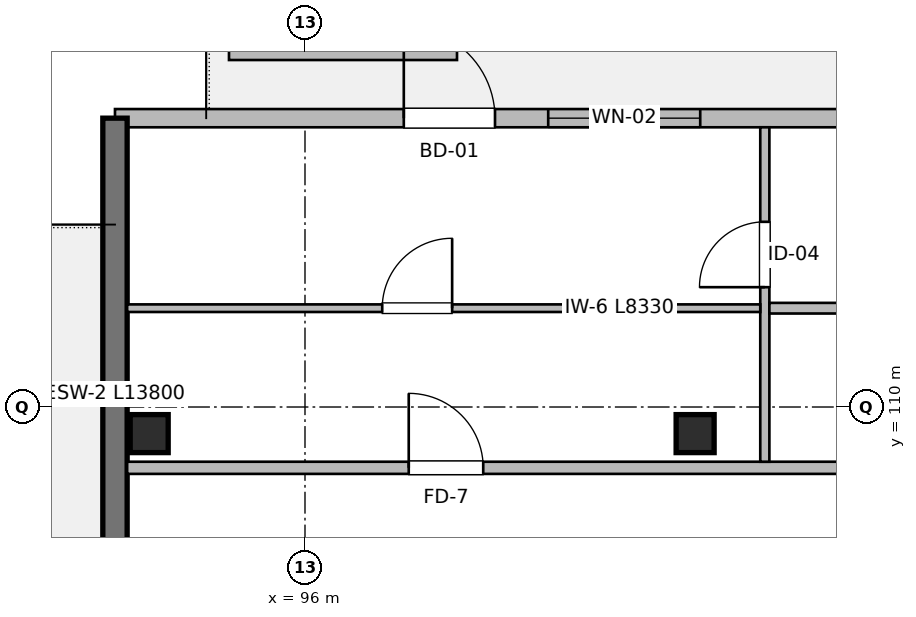
"""IFC4 building model, lengths in metres.
Left out: names, types, materials, properties, quantities, classifications, styles, units other than length and angle.
Written with IfcOpenShell. Run it as: python <this file> out.ifc"""

import sys

from ifc_helpers import new_model, si_unit, direction, frame, frame_2d, origin, origin_2d, place, context, subcontext, project, spatial, rectangle, extrude, element, fill, save


model = new_model("IFC4")
c1 = context("Model", 3, precision=1e-05, world=origin(), true_north=direction((0.0, 1.0)))
c2 = subcontext(c1, "Body", "Model", "MODEL_VIEW")
j1 = project(units=[si_unit("LENGTHUNIT", "METRE"), si_unit("PLANEANGLEUNIT", "RADIAN")], contexts=[c1])
p1 = place(None, origin())
s1 = spatial("IfcSite", under=j1, at=p1, CompositionType="ELEMENT")
p2 = place(p1, origin())
s2 = spatial("IfcBuilding", under=s1, at=p2, CompositionType="ELEMENT")
p3 = place(p2, frame((0.0, 0.0, 36.16)))
s3 = spatial("IfcBuildingStorey", under=s2, at=p3, CompositionType="ELEMENT", Elevation=36.16)
for number, where, z_axis, x_axis in (
    (1, (93.95, 109.65, 0.0), (0.0, 0.0, 1.0), (1.0, 0.0, 0.0)),
    (2, (101.133, 109.65, 0.0), (0.0, 0.0, 1.0), (1.0, 0.0, 0.0)),
):
    element("IfcColumn", number, at=place(p3, frame(where, z_axis=z_axis, x_axis=x_axis)), inside=s3, PredefinedType="COLUMN", context=c2, shape_type="SweptSolid", body=[
        extrude(rectangle(XDim=0.5, YDim=0.5, at=origin_2d()), origin(), (0.0, 0.0, 1.0), 3.2),
    ])
p4 = place(p3, frame((93.5, 113.8, 0.0), z_axis=(0.0, 0.0, 1.0), x_axis=(1.0, 0.0, 0.0)))
e3 = element("IfcWall", 3, at=p4, inside=s3, PredefinedType="SOLIDWALL", context=c2, shape_type="SweptSolid", body=[
    extrude(rectangle(XDim=44.0, YDim=0.24, at=frame_2d((22.0, 0.0))), origin(), (0.0, 0.0, 1.0), 2.98),
])
p5 = place(p4, frame((3.8, 0.0, 0.0)))
e4 = element("IfcOpeningElement", 4, at=p5, cuts=e3, PredefinedType="OPENING", context=c2, shape_type="SweptSolid", body=[
    extrude(rectangle(XDim=1.2, YDim=2.2, at=frame_2d((0.6, 1.1))), frame((0.0, 0.13, 0.0), z_axis=(0.0, -1.0, 0.0), x_axis=(1.0, 0.0, 0.0)), (0.0, 0.0, 1.0), 0.26),
])
p6 = place(p4, frame((5.7, 0.0, 0.72)))
e5 = element("IfcOpeningElement", 5, at=p6, cuts=e3, PredefinedType="OPENING", context=c2, shape_type="SweptSolid", body=[
    extrude(rectangle(XDim=2.0, YDim=1.5, at=frame_2d((1.0, 0.75))), frame((0.0, 0.13, 0.0), z_axis=(0.0, -1.0, 0.0), x_axis=(1.0, 0.0, 0.0)), (0.0, 0.0, 1.0), 0.26),
])
p7 = place(p4, frame((12.15, 0.0, 0.67)))
e6 = element("IfcOpeningElement", 6, at=p7, cuts=e3, PredefinedType="OPENING", context=c2, shape_type="SweptSolid", body=[
    extrude(rectangle(XDim=2.1, YDim=1.55, at=frame_2d((1.05, 0.775))), frame((0.0, 0.13, 0.0), z_axis=(0.0, -1.0, 0.0), x_axis=(1.0, 0.0, 0.0)), (0.0, 0.0, 1.0), 0.26),
])
p8 = place(p4, frame((21.4, 0.0, 0.0)))
e7 = element("IfcOpeningElement", 7, at=p8, cuts=e3, PredefinedType="OPENING", context=c2, shape_type="SweptSolid", body=[
    extrude(rectangle(XDim=1.2, YDim=2.2, at=frame_2d((0.6, 1.1))), frame((0.0, 0.13, 0.0), z_axis=(0.0, -1.0, 0.0), x_axis=(1.0, 0.0, 0.0)), (0.0, 0.0, 1.0), 0.26),
])
p9 = place(p4, frame((23.3, 0.0, 0.77)))
e8 = element("IfcOpeningElement", 8, at=p9, cuts=e3, PredefinedType="OPENING", context=c2, shape_type="SweptSolid", body=[
    extrude(rectangle(XDim=1.6, YDim=1.45, at=frame_2d((0.8, 0.725))), frame((0.0, 0.13, 0.0), z_axis=(0.0, -1.0, 0.0), x_axis=(1.0, 0.0, 0.0)), (0.0, 0.0, 1.0), 0.26),
])
p10 = place(p4, frame((30.275, 0.0, 0.9)))
e9 = element("IfcOpeningElement", 9, at=p10, cuts=e3, PredefinedType="OPENING", context=c2, shape_type="SweptSolid", body=[
    extrude(rectangle(XDim=1.05, YDim=1.15, at=frame_2d((0.525, 0.575))), frame((0.0, 0.13, 0.0), z_axis=(0.0, -1.0, 0.0), x_axis=(1.0, 0.0, 0.0)), (0.0, 0.0, 1.0), 0.26),
])
p11 = place(p4, frame((39.0, 0.0, 0.0)))
e10 = element("IfcOpeningElement", 10, at=p11, cuts=e3, PredefinedType="OPENING", context=c2, shape_type="SweptSolid", body=[
    extrude(rectangle(XDim=1.2, YDim=2.2, at=frame_2d((0.6, 1.1))), frame((0.0, 0.13, 0.0), z_axis=(0.0, -1.0, 0.0), x_axis=(1.0, 0.0, 0.0)), (0.0, 0.0, 1.0), 0.26),
])
p12 = place(p4, frame((40.9, 0.0, 0.82)))
e11 = element("IfcOpeningElement", 11, at=p12, cuts=e3, PredefinedType="OPENING", context=c2, shape_type="SweptSolid", body=[
    extrude(rectangle(XDim=1.5, YDim=1.4, at=frame_2d((0.75, 0.7))), frame((0.0, 0.13, 0.0), z_axis=(0.0, -1.0, 0.0), x_axis=(1.0, 0.0, 0.0)), (0.0, 0.0, 1.0), 0.26),
])
p13 = place(p3, frame((93.5, 100.0, 0.0), z_axis=(0.0, 0.0, 1.0), x_axis=(0.0, 1.0, 0.0)))
e12 = element("IfcWall", 12, at=p13, inside=s3, PredefinedType="SHEAR", context=c2, shape_type="SweptSolid", body=[
    extrude(rectangle(XDim=13.8, YDim=0.32, at=frame_2d((6.9, 0.0))), origin(), (0.0, 0.0, 1.0), 2.98),
])
p14 = place(p13, frame((5.0, 0.0, 0.0)))
e13 = element("IfcOpeningElement", 13, at=p14, cuts=e12, PredefinedType="OPENING", context=c2, shape_type="SweptSolid", body=[
    extrude(rectangle(XDim=1.2, YDim=2.2, at=frame_2d((0.6, 1.1))), frame((0.0, 0.17, 0.0), z_axis=(0.0, -1.0, 0.0), x_axis=(1.0, 0.0, 0.0)), (0.0, 0.0, 1.0), 0.34),
])
p15 = place(p3, frame((95.0, 114.65, 0.0), z_axis=(0.0, 0.0, 1.0), x_axis=(1.0, 0.0, 0.0)))
e14 = element("IfcWall", 14, at=p15, inside=s3, PredefinedType="PARAPET", context=c2, shape_type="SweptSolid", body=[
    extrude(rectangle(XDim=3.0, YDim=0.17, at=frame_2d((1.5, 0.0))), origin(), (0.0, 0.0, 1.0), 0.45),
])
p16 = place(p3, frame((93.66, 109.2, 0.0), z_axis=(0.0, 0.0, 1.0), x_axis=(1.0, 0.0, 0.0)))
e15 = element("IfcWall", 15, at=p16, inside=s3, PredefinedType="PARTITIONING", context=c2, shape_type="SweptSolid", body=[
    extrude(rectangle(XDim=43.68, YDim=0.16, at=frame_2d((21.84, 0.0))), origin(), (0.0, 0.0, 1.0), 2.935),
])
p17 = place(p16, frame((3.705, 0.0, 0.0)))
e16 = element("IfcOpeningElement", 16, at=p17, cuts=e15, PredefinedType="OPENING", context=c2, shape_type="SweptSolid", body=[
    extrude(rectangle(XDim=0.98, YDim=2.15, at=frame_2d((0.49, 1.075))), frame((0.0, 0.09, 0.0), z_axis=(0.0, -1.0, 0.0), x_axis=(1.0, 0.0, 0.0)), (0.0, 0.0, 1.0), 0.18),
])
p18 = place(p16, frame((18.33, 0.0, 0.0)))
e17 = element("IfcOpeningElement", 17, at=p18, cuts=e15, PredefinedType="OPENING", context=c2, shape_type="SweptSolid", body=[
    extrude(rectangle(XDim=0.98, YDim=2.15, at=frame_2d((0.49, 1.075))), frame((0.0, 0.09, 0.0), z_axis=(0.0, -1.0, 0.0), x_axis=(1.0, 0.0, 0.0)), (0.0, 0.0, 1.0), 0.18),
])
p19 = place(p16, frame((32.915, 0.0, 0.0)))
e18 = element("IfcOpeningElement", 18, at=p19, cuts=e15, PredefinedType="OPENING", context=c2, shape_type="SweptSolid", body=[
    extrude(rectangle(XDim=0.98, YDim=2.15, at=frame_2d((0.49, 1.075))), frame((0.0, 0.09, 0.0), z_axis=(0.0, -1.0, 0.0), x_axis=(1.0, 0.0, 0.0)), (0.0, 0.0, 1.0), 0.18),
])
p20 = place(p3, frame((102.05, 109.28, 0.0), z_axis=(0.0, 0.0, 1.0), x_axis=(0.0, 1.0, 0.0)))
e19 = element("IfcWall", 19, at=p20, inside=s3, PredefinedType="PARTITIONING", context=c2, shape_type="SweptSolid", body=[
    extrude(rectangle(XDim=4.4, YDim=0.12, at=frame_2d((2.2, 0.0))), origin(), (0.0, 0.0, 1.0), 2.935),
])
p21 = place(p20, frame((2.296, 0.0, 0.0)))
e20 = element("IfcOpeningElement", 20, at=p21, cuts=e19, PredefinedType="OPENING", context=c2, shape_type="SweptSolid", body=[
    extrude(rectangle(XDim=0.86, YDim=2.1, at=frame_2d((0.43, 1.05))), frame((0.0, 0.07, 0.0), z_axis=(0.0, -1.0, 0.0), x_axis=(1.0, 0.0, 0.0)), (0.0, 0.0, 1.0), 0.14),
])
p22 = place(p3, frame((102.11, 111.3, 0.0), z_axis=(0.0, 0.0, 1.0), x_axis=(1.0, 0.0, 0.0)))
e21 = element("IfcWall", 21, at=p22, inside=s3, PredefinedType="PARTITIONING", context=c2, shape_type="SweptSolid", body=[
    extrude(rectangle(XDim=6.02, YDim=0.14, at=frame_2d((3.01, 0.0))), origin(), (0.0, 0.0, 1.0), 2.935),
])
p23 = place(p22, frame((2.432, 0.0, 0.0)))
e22 = element("IfcOpeningElement", 22, at=p23, cuts=e21, PredefinedType="OPENING", context=c2, shape_type="SweptSolid", body=[
    extrude(rectangle(XDim=0.85, YDim=2.05, at=frame_2d((0.425, 1.025))), frame((0.0, 0.08, 0.0), z_axis=(0.0, -1.0, 0.0), x_axis=(1.0, 0.0, 0.0)), (0.0, 0.0, 1.0), 0.16),
])
p24 = place(p3, frame((93.66, 111.3, 0.0), z_axis=(0.0, 0.0, 1.0), x_axis=(1.0, 0.0, 0.0)))
e23 = element("IfcWall", 23, at=p24, inside=s3, PredefinedType="PARTITIONING", context=c2, shape_type="SweptSolid", body=[
    extrude(rectangle(XDim=8.33, YDim=0.1, at=frame_2d((4.165, 0.0))), origin(), (0.0, 0.0, 1.0), 2.935),
])
p25 = place(p24, frame((3.356, 0.0, 0.0)))
e24 = element("IfcOpeningElement", 24, at=p25, cuts=e23, PredefinedType="OPENING", context=c2, shape_type="SweptSolid", body=[
    extrude(rectangle(XDim=0.92, YDim=2.1, at=frame_2d((0.46, 1.05))), frame((0.0, 0.06, 0.0), z_axis=(0.0, -1.0, 0.0), x_axis=(1.0, 0.0, 0.0)), (0.0, 0.0, 1.0), 0.12),
])
p26 = place(p5, origin())
e25 = element("IfcDoor", 25, at=p26, inside=s3, OperationType="SINGLE_SWING_LEFT", PredefinedType="DOOR", context=c2, shape_type="SweptSolid", body=[
    extrude(rectangle(XDim=1.2, YDim=2.2, at=frame_2d((0.6, 1.1))), frame((0.0, 0.025, 0.0), z_axis=(0.0, -1.0, 0.0), x_axis=(1.0, 0.0, 0.0)), (0.0, 0.0, 1.0), 0.05),
])
fill(e4, e25)
p27 = place(p6, origin())
e26 = element("IfcWindow", 26, at=p27, inside=s3, PartitioningType="SINGLE_PANEL", PredefinedType="WINDOW", context=c2, shape_type="SweptSolid", body=[
    extrude(rectangle(XDim=2.0, YDim=1.5, at=frame_2d((1.0, 0.75))), frame((0.0, 0.03, 0.0), z_axis=(0.0, -1.0, 0.0), x_axis=(1.0, 0.0, 0.0)), (0.0, 0.0, 1.0), 0.06),
])
fill(e5, e26)
p28 = place(p17, origin())
e27 = element("IfcDoor", 27, at=p28, inside=s3, OperationType="SINGLE_SWING_LEFT", PredefinedType="DOOR", context=c2, shape_type="SweptSolid", body=[
    extrude(rectangle(XDim=0.98, YDim=2.15, at=frame_2d((0.49, 1.075))), frame((0.0, 0.025, 0.0), z_axis=(0.0, -1.0, 0.0), x_axis=(1.0, 0.0, 0.0)), (0.0, 0.0, 1.0), 0.05),
])
fill(e16, e27)
p29 = place(p25, origin())
e28 = element("IfcDoor", 28, at=p29, inside=s3, OperationType="SINGLE_SWING_RIGHT", PredefinedType="DOOR", context=c2, shape_type="SweptSolid", body=[
    extrude(rectangle(XDim=0.92, YDim=2.1, at=frame_2d((0.46, 1.05))), frame((0.0, 0.025, 0.0), z_axis=(0.0, -1.0, 0.0), x_axis=(1.0, 0.0, 0.0)), (0.0, 0.0, 1.0), 0.05),
])
fill(e24, e28)
p30 = place(p21, origin())
e29 = element("IfcDoor", 29, at=p30, inside=s3, OperationType="SINGLE_SWING_LEFT", PredefinedType="DOOR", context=c2, shape_type="SweptSolid", body=[
    extrude(rectangle(XDim=0.86, YDim=2.1, at=frame_2d((0.43, 1.05))), frame((0.0, 0.025, 0.0), z_axis=(0.0, -1.0, 0.0), x_axis=(1.0, 0.0, 0.0)), (0.0, 0.0, 1.0), 0.05),
])
fill(e20, e29)
save(model, sys.argv[1])
